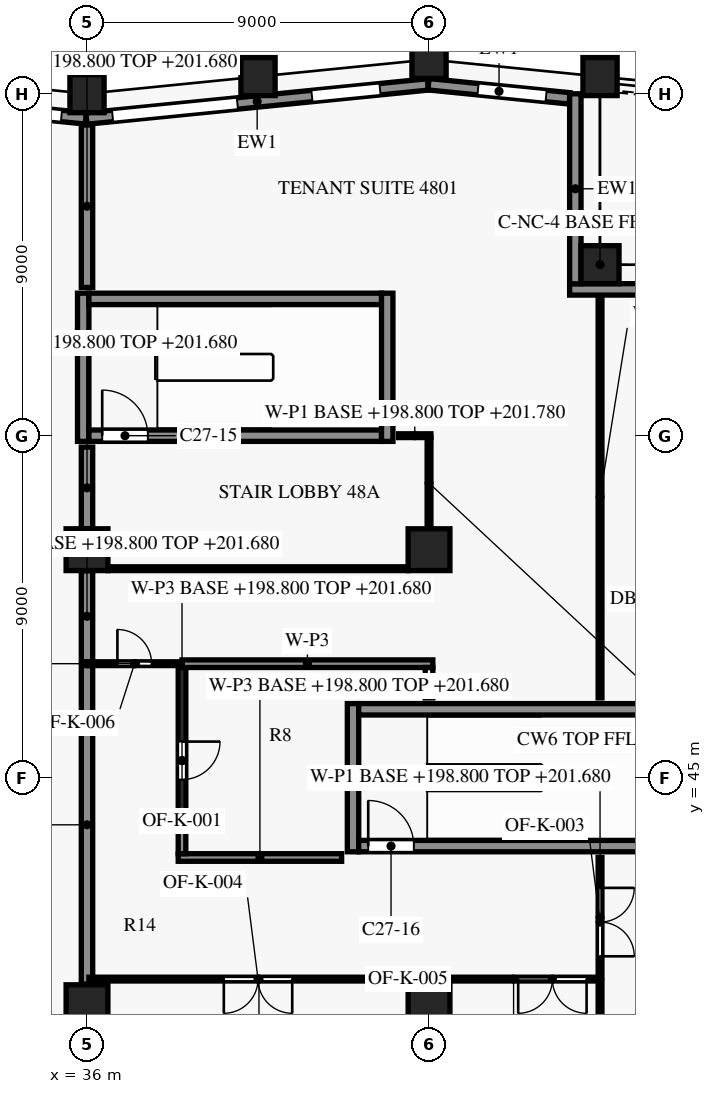
"""IFC4 building model, lengths in metres.
Left out: names, types, materials, properties, quantities, classifications, styles, units other than length and angle.
Written with IfcOpenShell. Run it as: python <this file> out.ifc"""

import sys

from ifc_helpers import new_model, si_unit, direction, frame, frame_2d, origin, origin_2d, place, context, subcontext, project, spatial, rectangle, extrude, element, fill, save


model = new_model("IFC4")
c1 = context("Model", 3, precision=1e-05, world=origin(), true_north=direction((0.0, 1.0)))
c2 = subcontext(c1, "Body", "Model", "MODEL_VIEW")
j1 = project(units=[si_unit("LENGTHUNIT", "METRE"), si_unit("PLANEANGLEUNIT", "RADIAN")], contexts=[c1])
p1 = place(None, origin())
s1 = spatial("IfcSite", under=j1, at=p1, CompositionType="ELEMENT")
p2 = place(p1, origin())
s2 = spatial("IfcBuilding", under=s1, at=p2, CompositionType="ELEMENT")
p3 = place(p2, frame((0.0, 0.0, 198.8)))
s3 = spatial("IfcBuildingStorey", under=s2, at=p3, CompositionType="ELEMENT", Elevation=198.8)
for number, where, z_axis, x_axis in (
    (1, (49.5, 63.45, 0.0), (0.0, 0.0, 1.0), (-0.995, 0.1, 0.0)),
    (2, (45.0, 63.9, 0.0), (0.0, 0.0, 1.0), (-1.0, 0.0, 0.0)),
    (3, (40.5, 63.45, 0.0), (0.0, 0.0, 1.0), (-0.995, -0.1, 0.0)),
    (4, (36.0, 63.0, 0.0), (0.0, 0.0, 1.0), (-1.0, 0.0, 0.0)),
):
    element("IfcColumn", number, at=place(p3, frame(where, z_axis=z_axis, x_axis=x_axis)), inside=s3, PredefinedType="COLUMN", context=c2, shape_type="SweptSolid", body=[
        extrude(rectangle(XDim=0.9, YDim=1.0, at=origin_2d()), origin(), (0.0, 0.0, 1.0), 3.8),
    ])
p4 = place(p3, frame((49.5, 58.5, -0.3), z_axis=(0.0, 0.0, 1.0), x_axis=(1.0, 0.0, 0.0)))
e5 = element("IfcColumn", 5, at=p4, inside=s3, PredefinedType="COLUMN", context=c2, shape_type="SweptSolid", body=[
    extrude(rectangle(XDim=1.0, YDim=1.0, at=origin_2d()), origin(), (0.0, 0.0, 1.0), 4.1),
])
for number, where, z_axis, x_axis in (
    (6, (36.0, 39.0, 0.0), (0.0, 0.0, 1.0), (1.0, 0.0, 0.0)),
    (7, (36.0, 51.0, 0.0), (0.0, 0.0, 1.0), (1.0, 0.0, 0.0)),
    (8, (45.0, 39.0, 0.0), (0.0, 0.0, 1.0), (1.0, 0.0, 0.0)),
    (9, (45.0, 51.0, 0.0), (0.0, 0.0, 1.0), (1.0, 0.0, 0.0)),
):
    element("IfcColumn", number, at=place(p3, frame(where, z_axis=z_axis, x_axis=x_axis)), inside=s3, PredefinedType="COLUMN", context=c2, shape_type="SweptSolid", body=[
        extrude(rectangle(XDim=1.1, YDim=1.1, at=origin_2d()), origin(), (0.0, 0.0, 1.0), 3.8),
    ])
p5 = place(p3, frame((48.7, 57.85, 0.0), z_axis=(0.0, 0.0, 1.0), x_axis=(1.0, 0.0, 0.0)))
e10 = element("IfcWall", 10, at=p5, inside=s3, PredefinedType="SOLIDWALL", context=c2, shape_type="SweptSolid", body=[
    extrude(rectangle(XDim=4.85, YDim=0.3, at=frame_2d((2.425, 0.0))), origin(), (0.0, 0.0, 1.0), 3.15),
])
p6 = place(p3, frame((48.85, 62.998, 0.0), z_axis=(0.0, 0.0, 1.0), x_axis=(0.0, -1.0, 0.0)))
e11 = element("IfcWall", 11, at=p6, inside=s3, PredefinedType="SOLIDWALL", context=c2, shape_type="SweptSolid", body=[
    extrude(rectangle(XDim=5.0, YDim=0.3, at=frame_2d((2.5, 0.0))), origin(), (0.0, 0.0, 1.0), 3.15),
])
p7 = place(p3, frame((44.985, 63.248, 0.0), z_axis=(0.0, 0.0, 1.0), x_axis=(0.995037837869, -0.099497242219, 0.0)))
e12 = element("IfcWall", 12, at=p7, inside=s3, PredefinedType="SOLIDWALL", context=c2, shape_type="SweptSolid", body=[
    extrude(rectangle(XDim=3.732, YDim=0.3, at=frame_2d((1.866, 0.0))), origin(), (0.0, 0.0, 1.0), 3.15),
])
p8 = place(p7, frame((1.311, 0.0, 0.75)))
e13 = element("IfcOpeningElement", 13, at=p8, cuts=e12, PredefinedType="OPENING", context=c2, shape_type="SweptSolid", body=[
    extrude(rectangle(XDim=1.8, YDim=1.8, at=frame_2d((0.9, 0.9))), frame((0.0, 0.16, 0.0), z_axis=(0.0, -1.0, 0.0), x_axis=(1.0, 0.0, 0.0)), (0.0, 0.0, 1.0), 0.32),
])
p9 = place(p3, frame((35.985, 62.345, 0.0), z_axis=(0.0, 0.0, 1.0), x_axis=(0.995035316196, 0.099522457379, 0.0)))
e14 = element("IfcWall", 14, at=p9, inside=s3, PredefinedType="SOLIDWALL", context=c2, shape_type="SweptSolid", body=[
    extrude(rectangle(XDim=9.03, YDim=0.3, at=frame_2d((4.515, 0.0))), origin(), (0.0, 0.0, 1.0), 3.15),
])
p10 = place(p9, frame((0.691, 0.0, 0.15)))
e15 = element("IfcOpeningElement", 15, at=p10, cuts=e14, PredefinedType="OPENING", context=c2, shape_type="SweptSolid", body=[
    extrude(rectangle(XDim=3.3, YDim=2.4, at=frame_2d((1.65, 1.2))), frame((0.0, 0.16, 0.0), z_axis=(0.0, -1.0, 0.0), x_axis=(1.0, 0.0, 0.0)), (0.0, 0.0, 1.0), 0.32),
])
p11 = place(p9, frame((5.964, 0.0, 0.75)))
e16 = element("IfcOpeningElement", 16, at=p11, cuts=e14, PredefinedType="OPENING", context=c2, shape_type="SweptSolid", body=[
    extrude(rectangle(XDim=1.8, YDim=1.8, at=frame_2d((0.9, 0.9))), frame((0.0, 0.16, 0.0), z_axis=(0.0, -1.0, 0.0), x_axis=(1.0, 0.0, 0.0)), (0.0, 0.0, 1.0), 0.32),
])
p12 = place(p3, frame((27.085, 63.238, 0.0), z_axis=(0.0, 0.0, 1.0), x_axis=(0.995035836657, -0.099517253618, 0.0)))
e17 = element("IfcWall", 17, at=p12, inside=s3, PredefinedType="SOLIDWALL", context=c2, shape_type="SweptSolid", body=[
    extrude(rectangle(XDim=8.93, YDim=0.3, at=frame_2d((4.465, 0.0))), origin(), (0.0, 0.0, 1.0), 3.15),
])
p13 = place(p12, frame((1.211, 0.0, 0.75)))
e18 = element("IfcOpeningElement", 18, at=p13, cuts=e17, PredefinedType="OPENING", context=c2, shape_type="SweptSolid", body=[
    extrude(rectangle(XDim=1.8, YDim=1.8, at=frame_2d((0.9, 0.9))), frame((0.0, 0.16, 0.0), z_axis=(0.0, -1.0, 0.0), x_axis=(1.0, 0.0, 0.0)), (0.0, 0.0, 1.0), 0.32),
])
p14 = place(p12, frame((4.984, 0.0, 0.15)))
e19 = element("IfcOpeningElement", 19, at=p14, cuts=e17, PredefinedType="OPENING", context=c2, shape_type="SweptSolid", body=[
    extrude(rectangle(XDim=3.3, YDim=2.4, at=frame_2d((1.65, 1.2))), frame((0.0, 0.16, 0.0), z_axis=(0.0, -1.0, 0.0), x_axis=(1.0, 0.0, 0.0)), (0.0, 0.0, 1.0), 0.32),
])
p15 = place(p3, frame((43.15, 43.2, 0.0), z_axis=(0.0, 0.0, 1.0), x_axis=(1.0, 0.0, 0.0)))
e20 = element("IfcWall", 20, at=p15, inside=s3, PredefinedType="SHEAR", context=c2, shape_type="SweptSolid", body=[
    extrude(rectangle(XDim=7.7, YDim=0.3, at=frame_2d((3.85, 0.0))), origin(), (0.0, 0.0, 1.0), 3.5),
])
p16 = place(p15, frame((0.25, 0.0, 0.0)))
e21 = element("IfcOpeningElement", 21, at=p16, cuts=e20, PredefinedType="OPENING", context=c2, shape_type="SweptSolid", body=[
    extrude(rectangle(XDim=1.2, YDim=2.2, at=frame_2d((0.6, 1.1))), frame((0.0, 0.16, 0.0), z_axis=(0.0, -1.0, 0.0), x_axis=(1.0, 0.0, 0.0)), (0.0, 0.0, 1.0), 0.32),
])
p17 = place(p3, frame((43.15, 46.8, 0.0), z_axis=(0.0, 0.0, 1.0), x_axis=(1.0, 0.0, 0.0)))
e22 = element("IfcWall", 22, at=p17, inside=s3, PredefinedType="SHEAR", context=c2, shape_type="SweptSolid", body=[
    extrude(rectangle(XDim=7.7, YDim=0.3, at=frame_2d((3.85, 0.0))), origin(), (0.0, 0.0, 1.0), 3.5),
])
p18 = place(p3, frame((36.05, 54.0, 0.0), z_axis=(0.0, 0.0, 1.0), x_axis=(1.0, 0.0, 0.0)))
e23 = element("IfcWall", 23, at=p18, inside=s3, PredefinedType="SHEAR", context=c2, shape_type="SweptSolid", body=[
    extrude(rectangle(XDim=7.7, YDim=0.3, at=frame_2d((3.85, 0.0))), origin(), (0.0, 0.0, 1.0), 3.5),
])
p19 = place(p18, frame((0.35, 0.0, 0.0)))
e24 = element("IfcOpeningElement", 24, at=p19, cuts=e23, PredefinedType="OPENING", context=c2, shape_type="SweptSolid", body=[
    extrude(rectangle(XDim=1.2, YDim=2.2, at=frame_2d((0.6, 1.1))), frame((0.0, 0.16, 0.0), z_axis=(0.0, -1.0, 0.0), x_axis=(1.0, 0.0, 0.0)), (0.0, 0.0, 1.0), 0.32),
])
p20 = place(p3, frame((36.05, 57.6, 0.0), z_axis=(0.0, 0.0, 1.0), x_axis=(1.0, 0.0, 0.0)))
e25 = element("IfcWall", 25, at=p20, inside=s3, PredefinedType="SHEAR", context=c2, shape_type="SweptSolid", body=[
    extrude(rectangle(XDim=7.7, YDim=0.3, at=frame_2d((3.85, 0.0))), origin(), (0.0, 0.0, 1.0), 3.5),
])
for number, where, z_axis, x_axis in (
    (26, (35.9, 53.85, 0.0), (0.0, 0.0, 1.0), (0.0, 1.0, 0.0)),
    (27, (43.0, 43.05, 0.0), (0.0, 0.0, 1.0), (0.0, 1.0, 0.0)),
    (28, (43.9, 53.85, 0.0), (0.0, 0.0, 1.0), (0.0, 1.0, 0.0)),
):
    element("IfcWall", number, at=place(p3, frame(where, z_axis=z_axis, x_axis=x_axis)), inside=s3, PredefinedType="SHEAR", context=c2, shape_type="SweptSolid", body=[
        extrude(rectangle(XDim=3.9, YDim=0.3, at=frame_2d((1.95, 0.0))), origin(), (0.0, 0.0, 1.0), 3.5),
    ])
p21 = place(p3, frame((49.5, 32.32, 0.0), z_axis=(0.0, 0.0, 1.0), x_axis=(0.0, 1.0, 0.0)))
e29 = element("IfcWall", 29, at=p21, inside=s3, PredefinedType="PARTITIONING", context=c2, shape_type="SweptSolid", body=[
    extrude(rectangle(XDim=7.33, YDim=0.1, at=frame_2d((3.665, 0.0))), origin(), (0.0, 0.0, 1.0), 2.88),
])
p22 = place(p3, frame((45.0, 39.7, 0.0), z_axis=(0.0, 0.0, 1.0), x_axis=(-1.0, 0.0, 0.0)))
e30 = element("IfcWall", 30, at=p22, inside=s3, PredefinedType="PARTITIONING", context=c2, shape_type="SweptSolid", body=[
    extrude(rectangle(XDim=8.95, YDim=0.1, at=frame_2d((4.475, 0.0))), origin(), (0.0, 0.0, 1.0), 2.88),
])
p23 = place(p22, frame((3.6, 0.0, 0.0)))
e31 = element("IfcOpeningElement", 31, at=p23, cuts=e30, PredefinedType="OPENING", context=c2, shape_type="SweptSolid", body=[
    extrude(rectangle(XDim=1.8, YDim=2.1, at=frame_2d((0.9, 1.05))), frame((0.0, 0.06, 0.0), z_axis=(0.0, -1.0, 0.0), x_axis=(1.0, 0.0, 0.0)), (0.0, 0.0, 1.0), 0.12),
])
p24 = place(p3, frame((49.45, 39.7, 0.0), z_axis=(0.0, 0.0, 1.0), x_axis=(-1.0, 0.0, 0.0)))
e32 = element("IfcWall", 32, at=p24, inside=s3, PredefinedType="PARTITIONING", context=c2, shape_type="SweptSolid", body=[
    extrude(rectangle(XDim=4.45, YDim=0.1, at=frame_2d((2.225, 0.0))), origin(), (0.0, 0.0, 1.0), 2.98),
])
p25 = place(p24, frame((0.304, 0.0, 0.0)))
e33 = element("IfcOpeningElement", 33, at=p25, cuts=e32, PredefinedType="OPENING", context=c2, shape_type="SweptSolid", body=[
    extrude(rectangle(XDim=1.8, YDim=2.1, at=frame_2d((0.9, 1.05))), frame((0.0, 0.06, 0.0), z_axis=(0.0, -1.0, 0.0), x_axis=(1.0, 0.0, 0.0)), (0.0, 0.0, 1.0), 0.12),
])
p26 = place(p3, frame((36.0, 39.57, 0.0), z_axis=(0.0, 0.0, 1.0), x_axis=(0.0, 1.0, 0.0)))
e34 = element("IfcWall", 34, at=p26, inside=s3, PredefinedType="PARTITIONING", context=c2, shape_type="SweptSolid", body=[
    extrude(rectangle(XDim=8.38, YDim=0.3, at=frame_2d((4.19, 0.0))), origin(), (0.0, 0.0, 1.0), 2.88),
])
p27 = place(p3, frame((38.4, 42.9, 0.0), z_axis=(0.0, 0.0, 1.0), x_axis=(1.0, 0.0, 0.0)))
e35 = element("IfcWall", 35, at=p27, inside=s3, PredefinedType="PARTITIONING", context=c2, shape_type="SweptSolid", body=[
    extrude(rectangle(XDim=4.3, YDim=0.2, at=frame_2d((2.15, 0.0))), origin(), (0.0, 0.0, 1.0), 2.88),
])
p28 = place(p3, frame((49.5, 42.9, 0.0), z_axis=(0.0, 0.0, 1.0), x_axis=(0.0, -1.0, 0.0)))
e36 = element("IfcWall", 36, at=p28, inside=s3, PredefinedType="PARTITIONING", context=c2, shape_type="SweptSolid", body=[
    extrude(rectangle(XDim=3.15, YDim=0.1, at=frame_2d((1.575, 0.0))), origin(), (0.0, 0.0, 1.0), 2.88),
])
p29 = place(p28, frame((0.8, 0.0, 0.0)))
e37 = element("IfcOpeningElement", 37, at=p29, cuts=e36, PredefinedType="OPENING", context=c2, shape_type="SweptSolid", body=[
    extrude(rectangle(XDim=1.8, YDim=2.1, at=frame_2d((0.9, 1.05))), frame((0.0, 0.06, 0.0), z_axis=(0.0, -1.0, 0.0), x_axis=(1.0, 0.0, 0.0)), (0.0, 0.0, 1.0), 0.12),
])
p30 = place(p3, frame((49.5, 47.1, 0.0), z_axis=(0.0, 0.0, 1.0), x_axis=(0.0, 1.0, 0.0)))
e38 = element("IfcWall", 38, at=p30, inside=s3, PredefinedType="PARTITIONING", context=c2, shape_type="SweptSolid", body=[
    extrude(rectangle(XDim=10.58, YDim=0.1, at=frame_2d((5.29, 0.0))), origin(), (0.0, 0.0, 1.0), 2.88),
])
p31 = place(p3, frame((38.5, 47.9, 0.0), z_axis=(0.0, 0.0, 1.0), x_axis=(0.0, -1.0, 0.0)))
e39 = element("IfcWall", 39, at=p31, inside=s3, PredefinedType="PARTITIONING", context=c2, shape_type="SweptSolid", body=[
    extrude(rectangle(XDim=4.9, YDim=0.2, at=frame_2d((2.45, 0.0))), origin(), (0.0, 0.0, 1.0), 2.88),
])
p32 = place(p31, frame((1.95, 0.0, 0.0)))
e40 = element("IfcOpeningElement", 40, at=p32, cuts=e39, PredefinedType="OPENING", context=c2, shape_type="SweptSolid", body=[
    extrude(rectangle(XDim=1.0, YDim=2.1, at=frame_2d((0.5, 1.05))), frame((0.0, 0.11, 0.0), z_axis=(0.0, -1.0, 0.0), x_axis=(1.0, 0.0, 0.0)), (0.0, 0.0, 1.0), 0.22),
])
p33 = place(p3, frame((45.0, 47.9, 0.0), z_axis=(0.0, 0.0, 1.0), x_axis=(0.0, -1.0, 0.0)))
e41 = element("IfcWall", 41, at=p33, inside=s3, PredefinedType="PARTITIONING", context=c2, shape_type="SweptSolid", body=[
    extrude(rectangle(XDim=0.8, YDim=0.2, at=frame_2d((0.4, 0.0))), origin(), (0.0, 0.0, 1.0), 2.88),
])
p34 = place(p3, frame((36.05, 48.0, 0.0), z_axis=(0.0, 0.0, 1.0), x_axis=(1.0, 0.0, 0.0)))
e42 = element("IfcWall", 42, at=p34, inside=s3, PredefinedType="PARTITIONING", context=c2, shape_type="SweptSolid", body=[
    extrude(rectangle(XDim=2.45, YDim=0.1, at=frame_2d((1.225, 0.0))), origin(), (0.0, 0.0, 1.0), 2.88),
])
p35 = place(p34, frame((0.75, 0.0, 0.0)))
e43 = element("IfcOpeningElement", 43, at=p35, cuts=e42, PredefinedType="OPENING", context=c2, shape_type="SweptSolid", body=[
    extrude(rectangle(XDim=0.9, YDim=2.1, at=frame_2d((0.45, 1.05))), frame((0.0, 0.06, 0.0), z_axis=(0.0, -1.0, 0.0), x_axis=(1.0, 0.0, 0.0)), (0.0, 0.0, 1.0), 0.12),
])
p36 = place(p3, frame((38.5, 48.0, 0.0), z_axis=(0.0, 0.0, 1.0), x_axis=(1.0, 0.0, 0.0)))
e44 = element("IfcWall", 44, at=p36, inside=s3, PredefinedType="PARTITIONING", context=c2, shape_type="SweptSolid", body=[
    extrude(rectangle(XDim=6.6, YDim=0.2, at=frame_2d((3.3, 0.0))), origin(), (0.0, 0.0, 1.0), 3.48),
])
p37 = place(p3, frame((36.0, 48.05, 0.0), z_axis=(0.0, 0.0, 1.0), x_axis=(0.0, 1.0, 0.0)))
e45 = element("IfcWall", 45, at=p37, inside=s3, PredefinedType="PARTITIONING", context=c2, shape_type="SweptSolid", body=[
    extrude(rectangle(XDim=2.395, YDim=0.3, at=frame_2d((1.198, 0.0))), origin(), (0.0, 0.0, 1.0), 2.88),
])
p38 = place(p3, frame((44.445, 50.5, 0.0), z_axis=(0.0, 0.0, 1.0), x_axis=(-1.0, 0.0, 0.0)))
e46 = element("IfcWall", 46, at=p38, inside=s3, PredefinedType="PARTITIONING", context=c2, shape_type="SweptSolid", body=[
    extrude(rectangle(XDim=7.89, YDim=0.1, at=frame_2d((3.945, 0.0))), origin(), (0.0, 0.0, 1.0), 3.48),
])
p39 = place(p3, frame((36.0, 51.555, 0.0), z_axis=(0.0, 0.0, 1.0), x_axis=(0.0, 1.0, 0.0)))
e47 = element("IfcWall", 47, at=p39, inside=s3, PredefinedType="PARTITIONING", context=c2, shape_type="SweptSolid", body=[
    extrude(rectangle(XDim=2.145, YDim=0.3, at=frame_2d((1.073, 0.0))), origin(), (0.0, 0.0, 1.0), 2.88),
])
p40 = place(p3, frame((45.0, 53.95, 0.0), z_axis=(0.0, 0.0, 1.0), x_axis=(0.0, -1.0, 0.0)))
e48 = element("IfcWall", 48, at=p40, inside=s3, PredefinedType="PARTITIONING", context=c2, shape_type="SweptSolid", body=[
    extrude(rectangle(XDim=2.395, YDim=0.1, at=frame_2d((1.198, 0.0))), origin(), (0.0, 0.0, 1.0), 2.98),
])
p41 = place(p3, frame((44.2, 54.0, 0.0), z_axis=(0.0, 0.0, 1.0), x_axis=(1.0, 0.0, 0.0)))
e49 = element("IfcWall", 49, at=p41, inside=s3, PredefinedType="PARTITIONING", context=c2, shape_type="SweptSolid", body=[
    extrude(rectangle(XDim=0.85, YDim=0.1, at=frame_2d((0.425, 0.0))), origin(), (0.0, 0.0, 1.0), 2.98),
])
p42 = place(p3, frame((36.0, 57.9, 0.0), z_axis=(0.0, 0.0, 1.0), x_axis=(0.0, 1.0, 0.0)))
e50 = element("IfcWall", 50, at=p42, inside=s3, PredefinedType="PARTITIONING", context=c2, shape_type="SweptSolid", body=[
    extrude(rectangle(XDim=4.276, YDim=0.3, at=frame_2d((2.138, 0.0))), origin(), (0.0, 0.0, 1.0), 2.88),
])
p43 = place(p8, origin())
e51 = element("IfcWindow", 51, at=p43, inside=s3, PartitioningType="SINGLE_PANEL", PredefinedType="WINDOW", context=c2, shape_type="SweptSolid", body=[
    extrude(rectangle(XDim=1.8, YDim=1.8, at=frame_2d((0.9, 0.9))), frame((0.0, 0.03, 0.0), z_axis=(0.0, -1.0, 0.0), x_axis=(1.0, 0.0, 0.0)), (0.0, 0.0, 1.0), 0.06),
])
fill(e13, e51)
p44 = place(p10, origin())
e52 = element("IfcWindow", 52, at=p44, inside=s3, PartitioningType="SINGLE_PANEL", PredefinedType="WINDOW", context=c2, shape_type="SweptSolid", body=[
    extrude(rectangle(XDim=3.3, YDim=2.4, at=frame_2d((1.65, 1.2))), frame((0.0, 0.03, 0.0), z_axis=(0.0, -1.0, 0.0), x_axis=(1.0, 0.0, 0.0)), (0.0, 0.0, 1.0), 0.06),
])
fill(e15, e52)
p45 = place(p11, origin())
e53 = element("IfcWindow", 53, at=p45, inside=s3, PartitioningType="SINGLE_PANEL", PredefinedType="WINDOW", context=c2, shape_type="SweptSolid", body=[
    extrude(rectangle(XDim=1.8, YDim=1.8, at=frame_2d((0.9, 0.9))), frame((0.0, 0.03, 0.0), z_axis=(0.0, -1.0, 0.0), x_axis=(1.0, 0.0, 0.0)), (0.0, 0.0, 1.0), 0.06),
])
fill(e16, e53)
p46 = place(p14, origin())
e54 = element("IfcWindow", 54, at=p46, inside=s3, PartitioningType="SINGLE_PANEL", PredefinedType="WINDOW", context=c2, shape_type="SweptSolid", body=[
    extrude(rectangle(XDim=3.3, YDim=2.4, at=frame_2d((1.65, 1.2))), frame((0.0, 0.03, 0.0), z_axis=(0.0, -1.0, 0.0), x_axis=(1.0, 0.0, 0.0)), (0.0, 0.0, 1.0), 0.06),
])
fill(e19, e54)
p47 = place(p19, origin())
e55 = element("IfcDoor", 55, at=p47, inside=s3, OperationType="SINGLE_SWING_LEFT", PredefinedType="DOOR", context=c2, shape_type="SweptSolid", body=[
    extrude(rectangle(XDim=1.2, YDim=2.2, at=frame_2d((0.6, 1.1))), frame((0.0, 0.025, 0.0), z_axis=(0.0, -1.0, 0.0), x_axis=(1.0, 0.0, 0.0)), (0.0, 0.0, 1.0), 0.05),
])
fill(e24, e55)
p48 = place(p16, origin())
e56 = element("IfcDoor", 56, at=p48, inside=s3, OperationType="SINGLE_SWING_RIGHT", PredefinedType="DOOR", context=c2, shape_type="SweptSolid", body=[
    extrude(rectangle(XDim=1.2, YDim=2.2, at=frame_2d((0.6, 1.1))), frame((0.0, 0.025, 0.0), z_axis=(0.0, -1.0, 0.0), x_axis=(1.0, 0.0, 0.0)), (0.0, 0.0, 1.0), 0.05),
])
fill(e21, e56)
p49 = place(p32, origin())
e57 = element("IfcDoor", 57, at=p49, inside=s3, OperationType="SINGLE_SWING_RIGHT", PredefinedType="DOOR", context=c2, shape_type="SweptSolid", body=[
    extrude(rectangle(XDim=1.0, YDim=2.1, at=frame_2d((0.5, 1.05))), frame((0.0, 0.025, 0.0), z_axis=(0.0, -1.0, 0.0), x_axis=(1.0, 0.0, 0.0)), (0.0, 0.0, 1.0), 0.05),
])
fill(e40, e57)
p50 = place(p29, origin())
e58 = element("IfcDoor", 58, at=p50, inside=s3, OperationType="DOUBLE_DOOR_SINGLE_SWING", PredefinedType="DOOR", context=c2, shape_type="SweptSolid", body=[
    extrude(rectangle(XDim=1.8, YDim=2.1, at=frame_2d((0.9, 1.05))), frame((0.0, 0.025, 0.0), z_axis=(0.0, -1.0, 0.0), x_axis=(1.0, 0.0, 0.0)), (0.0, 0.0, 1.0), 0.05),
])
fill(e37, e58)
p51 = place(p23, origin())
e59 = element("IfcDoor", 59, at=p51, inside=s3, OperationType="DOUBLE_DOOR_SINGLE_SWING", PredefinedType="DOOR", context=c2, shape_type="SweptSolid", body=[
    extrude(rectangle(XDim=1.8, YDim=2.1, at=frame_2d((0.9, 1.05))), frame((0.0, 0.025, 0.0), z_axis=(0.0, -1.0, 0.0), x_axis=(1.0, 0.0, 0.0)), (0.0, 0.0, 1.0), 0.05),
])
fill(e31, e59)
p52 = place(p25, origin())
e60 = element("IfcDoor", 60, at=p52, inside=s3, OperationType="DOUBLE_DOOR_SINGLE_SWING", PredefinedType="DOOR", context=c2, shape_type="SweptSolid", body=[
    extrude(rectangle(XDim=1.8, YDim=2.1, at=frame_2d((0.9, 1.05))), frame((0.0, 0.025, 0.0), z_axis=(0.0, -1.0, 0.0), x_axis=(1.0, 0.0, 0.0)), (0.0, 0.0, 1.0), 0.05),
])
fill(e33, e60)
p53 = place(p35, origin())
e61 = element("IfcDoor", 61, at=p53, inside=s3, OperationType="SINGLE_SWING_LEFT", PredefinedType="DOOR", context=c2, shape_type="SweptSolid", body=[
    extrude(rectangle(XDim=0.9, YDim=2.1, at=frame_2d((0.45, 1.05))), frame((0.0, 0.025, 0.0), z_axis=(0.0, -1.0, 0.0), x_axis=(1.0, 0.0, 0.0)), (0.0, 0.0, 1.0), 0.05),
])
fill(e43, e61)
save(model, sys.argv[1])
